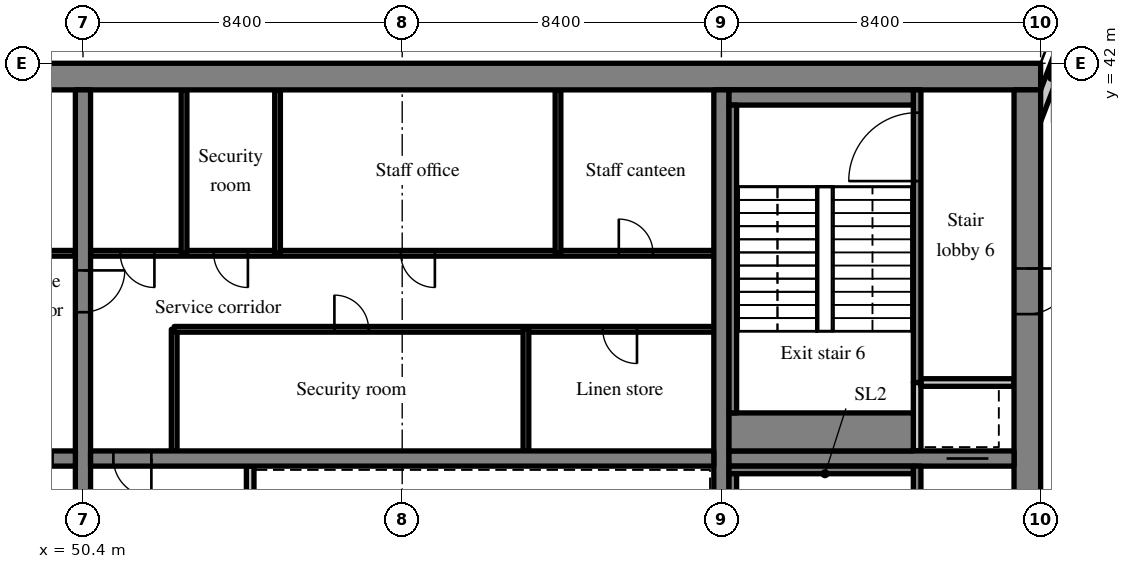
"""IFC4 building model, lengths in metres.
Left out: names, types, materials, properties, quantities, classifications, styles, units other than length and angle.
Written with IfcOpenShell. Run it as: python <this file> out.ifc"""

import sys

from ifc_helpers import new_model, si_unit, direction, frame, frame_2d, origin, place, context, subcontext, project, spatial, rectangle, extrude, source, transform, mapped, element, fill, save


model = new_model("IFC4")
c1 = context("Model", 3, precision=1e-05, world=origin(), true_north=direction((0.0, 1.0)))
c2 = subcontext(c1, "Body", "Model", "MODEL_VIEW")
j1 = project(units=[si_unit("LENGTHUNIT", "METRE"), si_unit("PLANEANGLEUNIT", "RADIAN")], contexts=[c1])
p1 = place(None, origin())
s1 = spatial("IfcSite", under=j1, at=p1, CompositionType="ELEMENT")
p2 = place(p1, origin())
s2 = spatial("IfcBuilding", under=s1, at=p2, CompositionType="ELEMENT")
p3 = place(p2, frame((0.0, 0.0, 189.6)))
s3 = spatial("IfcBuildingStorey", under=s2, at=p3, CompositionType="ELEMENT", Elevation=189.6)
m1 = source(origin(), c2, "Body", "SweptSolid", [
    extrude(rectangle(XDim=50.4, YDim=0.7, at=frame_2d((25.2, 0.0))), origin(), (0.0, 0.0, 1.0), 3.52),
])
p4 = place(p3, frame((25.2, 41.65, 0.0), z_axis=(0.0, 0.0, 1.0), x_axis=(1.0, 0.0, 0.0)))
e1 = element("IfcWall", 1, at=p4, inside=s3, PredefinedType="SHEAR", context=c2, shape_type="MappedRepresentation", body=[
    mapped(m1, transform((0.0, 0.0, 0.0), scale=1.0)),
])
m2 = source(origin(), c2, "Body", "SweptSolid", [
    extrude(rectangle(XDim=18.6, YDim=0.7, at=frame_2d((9.3, 0.0))), origin(), (0.0, 0.0, 1.0), 3.52),
])
p5 = place(p3, frame((75.25, 22.7, 0.0), z_axis=(0.0, 0.0, 1.0), x_axis=(0.0, 1.0, 0.0)))
e2 = element("IfcWall", 2, at=p5, inside=s3, PredefinedType="SHEAR", context=c2, shape_type="MappedRepresentation", body=[
    mapped(m2, transform((0.0, 0.0, 0.0), scale=1.0)),
])
m3 = source(origin(), c2, "Body", "SweptSolid", [
    extrude(rectangle(XDim=1.2, YDim=2.1, at=frame_2d((0.6, 1.05))), frame((0.0, 0.36, 0.0), z_axis=(0.0, -1.0, 0.0), x_axis=(1.0, 0.0, 0.0)), (0.0, 0.0, 1.0), 0.72),
])
p6 = place(p5, frame((12.7, 0.0, 0.0)))
e3 = element("IfcOpeningElement", 3, at=p6, cuts=e2, PredefinedType="OPENING", context=c2, shape_type="MappedRepresentation", body=[
    mapped(m3, transform((0.0, 0.0, 0.0), scale=1.0)),
])
m4 = source(origin(), c2, "Body", "SweptSolid", [
    extrude(rectangle(XDim=18.6, YDim=0.4, at=frame_2d((9.3, 0.0))), origin(), (0.0, 0.0, 1.0), 3.52),
])
p7 = place(p3, frame((50.4, 22.7, 0.0), z_axis=(0.0, 0.0, 1.0), x_axis=(0.0, 1.0, 0.0)))
e4 = element("IfcWall", 4, at=p7, inside=s3, PredefinedType="SHEAR", context=c2, shape_type="MappedRepresentation", body=[
    mapped(m4, transform((0.0, 0.0, 0.0), scale=1.0)),
])
m5 = source(origin(), c2, "Body", "SweptSolid", [
    extrude(rectangle(XDim=1.1, YDim=2.1, at=frame_2d((0.55, 1.05))), frame((0.0, 0.21, 0.0), z_axis=(0.0, -1.0, 0.0), x_axis=(1.0, 0.0, 0.0)), (0.0, 0.0, 1.0), 0.42),
])
p8 = place(p7, frame((12.75, 0.0, 0.0)))
e5 = element("IfcOpeningElement", 5, at=p8, cuts=e4, PredefinedType="OPENING", context=c2, shape_type="MappedRepresentation", body=[
    mapped(m5, transform((0.0, 0.0, 0.0), scale=1.0)),
])
p9 = place(p3, frame((67.2, 22.7, 0.0), z_axis=(0.0, 0.0, 1.0), x_axis=(0.0, 1.0, 0.0)))
e6 = element("IfcWall", 6, at=p9, inside=s3, PredefinedType="SHEAR", context=c2, shape_type="MappedRepresentation", body=[
    mapped(m4, transform((0.0, 0.0, 0.0), scale=1.0)),
])
m6 = source(origin(), c2, "Body", "SweptSolid", [
    extrude(rectangle(XDim=16.4, YDim=0.4, at=frame_2d((8.2, 0.0))), origin(), (0.0, 0.0, 1.0), 3.52),
])
p10 = place(p3, frame((33.8, 31.6, 0.0), z_axis=(0.0, 0.0, 1.0), x_axis=(1.0, 0.0, 0.0)))
e7 = element("IfcWall", 7, at=p10, inside=s3, PredefinedType="SHEAR", context=c2, shape_type="MappedRepresentation", body=[
    mapped(m6, transform((0.0, 0.0, 0.0), scale=1.0)),
])
m7 = source(origin(), c2, "Body", "SweptSolid", [
    extrude(rectangle(XDim=1.0, YDim=2.1, at=frame_2d((0.5, 1.05))), frame((0.0, 0.21, 0.0), z_axis=(0.0, -1.0, 0.0), x_axis=(1.0, 0.0, 0.0)), (0.0, 0.0, 1.0), 0.42),
])
p11 = place(p10, frame((14.8, 0.0, 0.0)))
e8 = element("IfcOpeningElement", 8, at=p11, cuts=e7, PredefinedType="OPENING", context=c2, shape_type="MappedRepresentation", body=[
    mapped(m7, transform((0.0, 0.0, 0.0), scale=1.0)),
])
p12 = place(p3, frame((50.6, 31.6, 0.0), z_axis=(0.0, 0.0, 1.0), x_axis=(1.0, 0.0, 0.0)))
e9 = element("IfcWall", 9, at=p12, inside=s3, PredefinedType="SHEAR", context=c2, shape_type="MappedRepresentation", body=[
    mapped(m6, transform((0.0, 0.0, 0.0), scale=1.0)),
])
p13 = place(p12, frame((0.6, 0.0, 0.0)))
e10 = element("IfcOpeningElement", 10, at=p13, cuts=e9, PredefinedType="OPENING", context=c2, shape_type="MappedRepresentation", body=[
    mapped(m7, transform((0.0, 0.0, 0.0), scale=1.0)),
])
m8 = source(origin(), c2, "Body", "SweptSolid", [
    extrude(rectangle(XDim=7.5, YDim=0.4, at=frame_2d((3.75, 0.0))), origin(), (0.0, 0.0, 1.0), 3.52),
])
p14 = place(p3, frame((67.4, 31.6, 0.0), z_axis=(0.0, 0.0, 1.0), x_axis=(1.0, 0.0, 0.0)))
e11 = element("IfcWall", 11, at=p14, inside=s3, PredefinedType="SHEAR", context=c2, shape_type="MappedRepresentation", body=[
    mapped(m8, transform((0.0, 0.0, 0.0), scale=1.0)),
])
p15 = place(p14, frame((5.725, 0.0, 0.0)))
e12 = element("IfcOpeningElement", 12, at=p15, cuts=e11, PredefinedType="OPENING", context=c2, shape_type="MappedRepresentation", body=[
    mapped(m5, transform((0.0, 0.0, 0.0), scale=1.0)),
])
m9 = source(origin(), c2, "Body", "SweptSolid", [
    extrude(rectangle(XDim=3.559, YDim=0.3, at=frame_2d((1.78, 0.0))), origin(), (0.0, 0.0, 1.0), 3.52),
])
p16 = place(p3, frame((76.523, 43.292, 0.0), z_axis=(0.0, 0.0, 1.0), x_axis=(-0.35779745313, -0.933799219604, 0.0)))
e13 = element("IfcWall", 13, at=p16, inside=s3, PredefinedType="SOLIDWALL", context=c2, shape_type="MappedRepresentation", body=[
    mapped(m9, transform((0.0, 0.0, 0.0), scale=1.0)),
])
m10 = source(origin(), c2, "Body", "SweptSolid", [
    extrude(rectangle(XDim=1.5, YDim=2.0, at=frame_2d((0.75, 1.0))), frame((0.0, 0.16, 0.0), z_axis=(0.0, -1.0, 0.0), x_axis=(1.0, 0.0, 0.0)), (0.0, 0.0, 1.0), 0.32),
])
p17 = place(p16, frame((0.156, 0.0, 0.9)))
e14 = element("IfcOpeningElement", 14, at=p17, cuts=e13, PredefinedType="OPENING", context=c2, shape_type="MappedRepresentation", body=[
    mapped(m10, transform((0.0, 0.0, 0.0), scale=1.0)),
])
m11 = source(origin(), c2, "Body", "SweptSolid", [
    extrude(rectangle(XDim=16.4, YDim=0.15, at=frame_2d((8.2, 0.0))), origin(), (0.0, 0.0, 1.0), 3.52),
])
p18 = place(p3, frame((33.8, 37.0, 0.0), z_axis=(0.0, 0.0, 1.0), x_axis=(1.0, 0.0, 0.0)))
e15 = element("IfcWall", 15, at=p18, inside=s3, PredefinedType="PARTITIONING", context=c2, shape_type="MappedRepresentation", body=[
    mapped(m11, transform((0.0, 0.0, 0.0), scale=1.0)),
])
m12 = source(origin(), c2, "Body", "SweptSolid", [
    extrude(rectangle(XDim=0.9, YDim=2.1, at=frame_2d((0.45, 1.05))), frame((0.0, 0.085, 0.0), z_axis=(0.0, -1.0, 0.0), x_axis=(1.0, 0.0, 0.0)), (0.0, 0.0, 1.0), 0.17),
])
p19 = place(p18, frame((6.52, 0.0, 0.0)))
e16 = element("IfcOpeningElement", 16, at=p19, cuts=e15, PredefinedType="OPENING", context=c2, shape_type="MappedRepresentation", body=[
    mapped(m12, transform((0.0, 0.0, 0.0), scale=1.0)),
])
p20 = place(p18, frame((14.72, 0.0, 0.0)))
e17 = element("IfcOpeningElement", 17, at=p20, cuts=e15, PredefinedType="OPENING", context=c2, shape_type="MappedRepresentation", body=[
    mapped(m12, transform((0.0, 0.0, 0.0), scale=1.0)),
])
m13 = source(origin(), c2, "Body", "SweptSolid", [
    extrude(rectangle(XDim=2.6, YDim=0.2, at=frame_2d((1.3, 0.0))), origin(), (0.0, 0.0, 1.0), 3.52),
])
p21 = place(p3, frame((54.8, 28.8, 0.0), z_axis=(0.0, 0.0, 1.0), x_axis=(0.0, 1.0, 0.0)))
e18 = element("IfcWall", 18, at=p21, inside=s3, PredefinedType="SOLIDWALL", context=c2, shape_type="MappedRepresentation", body=[
    mapped(m13, transform((0.0, 0.0, 0.0), scale=1.0)),
])
m14 = source(origin(), c2, "Body", "SweptSolid", [
    extrude(rectangle(XDim=3.2, YDim=0.15, at=frame_2d((1.6, 0.0))), origin(), (0.0, 0.0, 1.0), 3.52),
])
p22 = place(p3, frame((52.8, 31.8, 0.0), z_axis=(0.0, 0.0, 1.0), x_axis=(0.0, 1.0, 0.0)))
e19 = element("IfcWall", 19, at=p22, inside=s3, PredefinedType="PARTITIONING", context=c2, shape_type="MappedRepresentation", body=[
    mapped(m14, transform((0.0, 0.0, 0.0), scale=1.0)),
])
m15 = source(origin(), c2, "Body", "SweptSolid", [
    extrude(rectangle(XDim=14.2, YDim=0.15, at=frame_2d((7.1, 0.0))), origin(), (0.0, 0.0, 1.0), 3.52),
])
p23 = place(p3, frame((67.0, 35.0, 0.0), z_axis=(0.0, 0.0, 1.0), x_axis=(-1.0, 0.0, 0.0)))
e20 = element("IfcWall", 20, at=p23, inside=s3, PredefinedType="PARTITIONING", context=c2, shape_type="MappedRepresentation", body=[
    mapped(m15, transform((0.0, 0.0, 0.0), scale=1.0)),
])
p24 = place(p23, frame((2.022, 0.0, 0.0)))
e21 = element("IfcOpeningElement", 21, at=p24, cuts=e20, PredefinedType="OPENING", context=c2, shape_type="MappedRepresentation", body=[
    mapped(m12, transform((0.0, 0.0, 0.0), scale=1.0)),
])
p25 = place(p23, frame((9.084, 0.0, 0.0)))
e22 = element("IfcOpeningElement", 22, at=p25, cuts=e20, PredefinedType="OPENING", context=c2, shape_type="MappedRepresentation", body=[
    mapped(m12, transform((0.0, 0.0, 0.0), scale=1.0)),
])
p26 = place(p3, frame((67.0, 37.0, 0.0), z_axis=(0.0, 0.0, 1.0), x_axis=(-1.0, 0.0, 0.0)))
e23 = element("IfcWall", 23, at=p26, inside=s3, PredefinedType="PARTITIONING", context=c2, shape_type="MappedRepresentation", body=[
    mapped(m11, transform((0.0, 0.0, 0.0), scale=1.0)),
])
p27 = place(p26, frame((1.6, 0.0, 0.0)))
e24 = element("IfcOpeningElement", 24, at=p27, cuts=e23, PredefinedType="OPENING", context=c2, shape_type="MappedRepresentation", body=[
    mapped(m12, transform((0.0, 0.0, 0.0), scale=1.0)),
])
p28 = place(p26, frame((7.34, 0.0, 0.0)))
e25 = element("IfcOpeningElement", 25, at=p28, cuts=e23, PredefinedType="OPENING", context=c2, shape_type="MappedRepresentation", body=[
    mapped(m12, transform((0.0, 0.0, 0.0), scale=1.0)),
])
p29 = place(p26, frame((12.26, 0.0, 0.0)))
e26 = element("IfcOpeningElement", 26, at=p29, cuts=e23, PredefinedType="OPENING", context=c2, shape_type="MappedRepresentation", body=[
    mapped(m12, transform((0.0, 0.0, 0.0), scale=1.0)),
])
p30 = place(p26, frame((14.72, 0.0, 0.0)))
e27 = element("IfcOpeningElement", 27, at=p30, cuts=e23, PredefinedType="OPENING", context=c2, shape_type="MappedRepresentation", body=[
    mapped(m12, transform((0.0, 0.0, 0.0), scale=1.0)),
])
p31 = place(p3, frame((62.056, 31.8, 0.0), z_axis=(0.0, 0.0, 1.0), x_axis=(0.0, 1.0, 0.0)))
e28 = element("IfcWall", 28, at=p31, inside=s3, PredefinedType="PARTITIONING", context=c2, shape_type="MappedRepresentation", body=[
    mapped(m14, transform((0.0, 0.0, 0.0), scale=1.0)),
])
m16 = source(origin(), c2, "Body", "SweptSolid", [
    extrude(rectangle(XDim=4.3, YDim=0.15, at=frame_2d((2.15, 0.0))), origin(), (0.0, 0.0, 1.0), 3.52),
])
for number, where, z_axis, x_axis in (
    (29, (62.9, 37.0, 0.0), (0.0, 0.0, 1.0), (0.0, 1.0, 0.0)),
    (30, (55.52, 37.0, 0.0), (0.0, 0.0, 1.0), (0.0, 1.0, 0.0)),
    (31, (53.06, 37.0, 0.0), (0.0, 0.0, 1.0), (0.0, 1.0, 0.0)),
):
    element("IfcWall", number, at=place(p3, frame(where, z_axis=z_axis, x_axis=x_axis)), inside=s3, PredefinedType="PARTITIONING", context=c2, shape_type="MappedRepresentation", body=[
        mapped(m16, transform((0.0, 0.0, 0.0), scale=1.0)),
    ])
m17 = source(origin(), c2, "Body", "SweptSolid", [
    extrude(rectangle(XDim=8.7, YDim=0.2, at=frame_2d((4.35, 0.0))), origin(), (0.0, 0.0, 1.0), 3.52),
])
p32 = place(p3, frame((72.35, 22.7, 0.0), z_axis=(0.0, 0.0, 1.0), x_axis=(0.0, 1.0, 0.0)))
e32 = element("IfcWall", 32, at=p32, inside=s3, PredefinedType="SOLIDWALL", context=c2, shape_type="MappedRepresentation", body=[
    mapped(m17, transform((0.0, 0.0, 0.0), scale=1.0)),
])
m18 = source(origin(), c2, "Body", "SweptSolid", [
    extrude(rectangle(XDim=1.2, YDim=2.1, at=frame_2d((0.6, 1.05))), frame((0.0, 0.11, 0.0), z_axis=(0.0, -1.0, 0.0), x_axis=(1.0, 0.0, 0.0)), (0.0, 0.0, 1.0), 0.22),
])
p33 = place(p32, frame((6.8, 0.0, 0.0)))
e33 = element("IfcOpeningElement", 33, at=p33, cuts=e32, PredefinedType="OPENING", context=c2, shape_type="MappedRepresentation", body=[
    mapped(m18, transform((0.0, 0.0, 0.0), scale=1.0)),
])
m19 = source(origin(), c2, "Body", "SweptSolid", [
    extrude(rectangle(XDim=1.8, YDim=0.2, at=frame_2d((0.9, 0.0))), origin(), (0.0, 0.0, 1.0), 3.52),
])
p34 = place(p3, frame((72.35, 31.8, 0.0), z_axis=(0.0, 0.0, 1.0), x_axis=(0.0, 1.0, 0.0)))
e34 = element("IfcWall", 34, at=p34, inside=s3, PredefinedType="SOLIDWALL", context=c2, shape_type="MappedRepresentation", body=[
    mapped(m19, transform((0.0, 0.0, 0.0), scale=1.0)),
])
m20 = source(origin(), c2, "Body", "SweptSolid", [
    extrude(rectangle(XDim=2.45, YDim=0.2, at=frame_2d((1.225, 0.0))), origin(), (0.0, 0.0, 1.0), 3.52),
])
p35 = place(p3, frame((72.45, 33.6, 0.0), z_axis=(0.0, 0.0, 1.0), x_axis=(1.0, 0.0, 0.0)))
e35 = element("IfcWall", 35, at=p35, inside=s3, PredefinedType="SOLIDWALL", context=c2, shape_type="MappedRepresentation", body=[
    mapped(m20, transform((0.0, 0.0, 0.0), scale=1.0)),
])
m21 = source(origin(), c2, "Body", "SweptSolid", [
    extrude(rectangle(XDim=7.7, YDim=0.2, at=frame_2d((3.85, 0.0))), origin(), (0.0, 0.0, 1.0), 3.52),
])
p36 = place(p3, frame((72.35, 33.6, 0.0), z_axis=(0.0, 0.0, 1.0), x_axis=(0.0, 1.0, 0.0)))
e36 = element("IfcWall", 36, at=p36, inside=s3, PredefinedType="SOLIDWALL", context=c2, shape_type="MappedRepresentation", body=[
    mapped(m21, transform((0.0, 0.0, 0.0), scale=1.0)),
])
m22 = source(origin(), c2, "Body", "SweptSolid", [
    extrude(rectangle(XDim=1.8, YDim=2.1, at=frame_2d((0.9, 1.05))), frame((0.0, 0.11, 0.0), z_axis=(0.0, -1.0, 0.0), x_axis=(1.0, 0.0, 0.0)), (0.0, 0.0, 1.0), 0.22),
])
p37 = place(p36, frame((5.3, 0.0, 0.0)))
e37 = element("IfcOpeningElement", 37, at=p37, cuts=e36, PredefinedType="OPENING", context=c2, shape_type="MappedRepresentation", body=[
    mapped(m22, transform((0.0, 0.0, 0.0), scale=1.0)),
])
m23 = source(origin(), c2, "Body", "SweptSolid", [
    extrude(rectangle(XDim=4.85, YDim=0.2, at=frame_2d((2.425, 0.0))), origin(), (0.0, 0.0, 1.0), 3.52),
])
p38 = place(p3, frame((67.4, 31.3, 0.0), z_axis=(0.0, 0.0, 1.0), x_axis=(1.0, 0.0, 0.0)))
e38 = element("IfcWall", 38, at=p38, inside=s3, PredefinedType="SOLIDWALL", context=c2, shape_type="MappedRepresentation", body=[
    mapped(m23, transform((0.0, 0.0, 0.0), scale=1.0)),
])
m24 = source(origin(), c2, "Body", "SweptSolid", [
    extrude(rectangle(XDim=8.1, YDim=0.2, at=frame_2d((4.05, 0.0))), origin(), (0.0, 0.0, 1.0), 3.52),
])
p39 = place(p3, frame((67.5, 23.1, 0.0), z_axis=(0.0, 0.0, 1.0), x_axis=(0.0, 1.0, 0.0)))
e39 = element("IfcWall", 39, at=p39, inside=s3, PredefinedType="SOLIDWALL", context=c2, shape_type="MappedRepresentation", body=[
    mapped(m24, transform((0.0, 0.0, 0.0), scale=1.0)),
])
m25 = source(origin(), c2, "Body", "SweptSolid", [
    extrude(rectangle(XDim=4.85, YDim=0.4, at=frame_2d((2.425, 0.0))), origin(), (0.0, 0.0, 1.0), 3.52),
])
p40 = place(p3, frame((67.4, 41.1, 0.0), z_axis=(0.0, 0.0, 1.0), x_axis=(1.0, 0.0, 0.0)))
e40 = element("IfcWall", 40, at=p40, inside=s3, PredefinedType="SOLIDWALL", context=c2, shape_type="MappedRepresentation", body=[
    mapped(m25, transform((0.0, 0.0, 0.0), scale=1.0)),
])
m26 = source(origin(), c2, "Body", "SweptSolid", [
    extrude(rectangle(XDim=4.85, YDim=1.0, at=frame_2d((2.425, 0.0))), origin(), (0.0, 0.0, 1.0), 3.52),
])
p41 = place(p3, frame((67.4, 32.3, 0.0), z_axis=(0.0, 0.0, 1.0), x_axis=(1.0, 0.0, 0.0)))
e41 = element("IfcWall", 41, at=p41, inside=s3, PredefinedType="SOLIDWALL", context=c2, shape_type="MappedRepresentation", body=[
    mapped(m26, transform((0.0, 0.0, 0.0), scale=1.0)),
])
p42 = place(p3, frame((67.5, 32.8, 0.0), z_axis=(0.0, 0.0, 1.0), x_axis=(0.0, 1.0, 0.0)))
e42 = element("IfcWall", 42, at=p42, inside=s3, PredefinedType="SOLIDWALL", context=c2, shape_type="MappedRepresentation", body=[
    mapped(m24, transform((0.0, 0.0, 0.0), scale=1.0)),
])
m27 = source(origin(), c2, "Body", "SweptSolid", [
    extrude(rectangle(XDim=1.0, YDim=2.1, at=frame_2d((0.5, 1.05))), frame((0.0, 0.025, 0.0), z_axis=(0.0, -1.0, 0.0), x_axis=(1.0, 0.0, 0.0)), (0.0, 0.0, 1.0), 0.05),
])
p43 = place(p13, origin())
e43 = element("IfcDoor", 43, at=p43, inside=s3, OperationType="SINGLE_SWING_RIGHT", PredefinedType="DOOR", context=c2, shape_type="MappedRepresentation", body=[
    mapped(m27, transform((0.0, 0.0, 0.0), scale=1.0)),
])
fill(e10, e43)
m28 = source(origin(), c2, "Body", "SweptSolid", [
    extrude(rectangle(XDim=0.9, YDim=2.1, at=frame_2d((0.45, 1.05))), frame((0.0, 0.025, 0.0), z_axis=(0.0, -1.0, 0.0), x_axis=(1.0, 0.0, 0.0)), (0.0, 0.0, 1.0), 0.05),
])
p44 = place(p24, origin())
e44 = element("IfcDoor", 44, at=p44, inside=s3, OperationType="SINGLE_SWING_LEFT", PredefinedType="DOOR", context=c2, shape_type="MappedRepresentation", body=[
    mapped(m28, transform((0.0, 0.0, 0.0), scale=1.0)),
])
fill(e21, e44)
p45 = place(p25, origin())
e45 = element("IfcDoor", 45, at=p45, inside=s3, OperationType="SINGLE_SWING_RIGHT", PredefinedType="DOOR", context=c2, shape_type="MappedRepresentation", body=[
    mapped(m28, transform((0.0, 0.0, 0.0), scale=1.0)),
])
fill(e22, e45)
p46 = place(p27, origin())
e46 = element("IfcDoor", 46, at=p46, inside=s3, OperationType="SINGLE_SWING_RIGHT", PredefinedType="DOOR", context=c2, shape_type="MappedRepresentation", body=[
    mapped(m28, transform((0.0, 0.0, 0.0), scale=1.0)),
])
fill(e24, e46)
p47 = place(p28, origin())
e47 = element("IfcDoor", 47, at=p47, inside=s3, OperationType="SINGLE_SWING_LEFT", PredefinedType="DOOR", context=c2, shape_type="MappedRepresentation", body=[
    mapped(m28, transform((0.0, 0.0, 0.0), scale=1.0)),
])
fill(e25, e47)
p48 = place(p29, origin())
e48 = element("IfcDoor", 48, at=p48, inside=s3, OperationType="SINGLE_SWING_LEFT", PredefinedType="DOOR", context=c2, shape_type="MappedRepresentation", body=[
    mapped(m28, transform((0.0, 0.0, 0.0), scale=1.0)),
])
fill(e26, e48)
p49 = place(p30, origin())
e49 = element("IfcDoor", 49, at=p49, inside=s3, OperationType="SINGLE_SWING_LEFT", PredefinedType="DOOR", context=c2, shape_type="MappedRepresentation", body=[
    mapped(m28, transform((0.0, 0.0, 0.0), scale=1.0)),
])
fill(e27, e49)
m29 = source(origin(), c2, "Body", "SweptSolid", [
    extrude(rectangle(XDim=1.1, YDim=2.1, at=frame_2d((0.55, 1.05))), frame((0.0, 0.025, 0.0), z_axis=(0.0, -1.0, 0.0), x_axis=(1.0, 0.0, 0.0)), (0.0, 0.0, 1.0), 0.05),
])
p50 = place(p15, origin())
e50 = element("IfcDoor", 50, at=p50, inside=s3, OperationType="SLIDING_TO_RIGHT", PredefinedType="DOOR", context=c2, shape_type="MappedRepresentation", body=[
    mapped(m29, transform((0.0, 0.0, 0.0), scale=1.0)),
])
fill(e12, e50)
m30 = source(origin(), c2, "Body", "SweptSolid", [
    extrude(rectangle(XDim=1.8, YDim=2.1, at=frame_2d((0.9, 1.05))), frame((0.0, 0.025, 0.0), z_axis=(0.0, -1.0, 0.0), x_axis=(1.0, 0.0, 0.0)), (0.0, 0.0, 1.0), 0.05),
])
p51 = place(p37, origin())
e51 = element("IfcDoor", 51, at=p51, inside=s3, OperationType="SINGLE_SWING_LEFT", PredefinedType="DOOR", context=c2, shape_type="MappedRepresentation", body=[
    mapped(m30, transform((0.0, 0.0, 0.0), scale=1.0)),
])
fill(e37, e51)
m31 = source(origin(), c2, "Body", "SweptSolid", [
    extrude(rectangle(XDim=1.2, YDim=2.1, at=frame_2d((0.6, 1.05))), frame((0.0, 0.025, 0.0), z_axis=(0.0, -1.0, 0.0), x_axis=(1.0, 0.0, 0.0)), (0.0, 0.0, 1.0), 0.05),
])
p52 = place(p6, origin())
e52 = element("IfcDoor", 52, at=p52, inside=s3, OperationType="SINGLE_SWING_RIGHT", PredefinedType="DOOR", context=c2, shape_type="MappedRepresentation", body=[
    mapped(m31, transform((0.0, 0.0, 0.0), scale=1.0)),
])
fill(e3, e52)
p53 = place(p8, origin())
e53 = element("IfcDoor", 53, at=p53, inside=s3, OperationType="SINGLE_SWING_RIGHT", PredefinedType="DOOR", context=c2, shape_type="MappedRepresentation", body=[
    mapped(m29, transform((0.0, 0.0, 0.0), scale=1.0)),
])
fill(e5, e53)
save(model, sys.argv[1])
